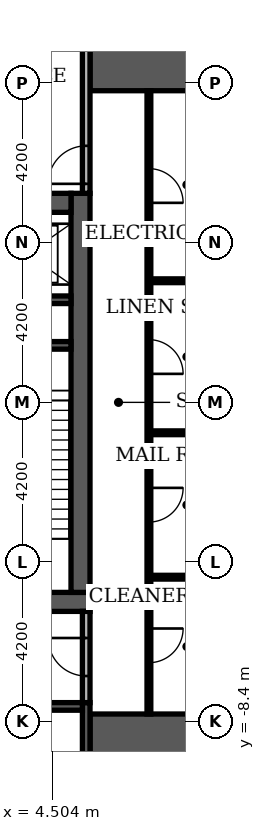
"""IFC4 building model, lengths in metres.
Left out: names, types, materials, properties, quantities, classifications, styles, units other than length and angle.
Written with IfcOpenShell. Run it as: python <this file> out.ifc"""

import sys

from ifc_helpers import new_model, si_unit, direction, frame, frame_2d, origin, place, context, subcontext, project, spatial, rectangle, extrude, element, fill, save


model = new_model("IFC4")
c1 = context("Model", 3, precision=1e-05, world=origin(), true_north=direction((0.0, 1.0)))
c2 = subcontext(c1, "Body", "Model", "MODEL_VIEW")
j1 = project(units=[si_unit("LENGTHUNIT", "METRE"), si_unit("PLANEANGLEUNIT", "RADIAN")], contexts=[c1])
p1 = place(None, origin())
s1 = spatial("IfcSite", under=j1, at=p1, CompositionType="ELEMENT")
p2 = place(p1, origin())
s2 = spatial("IfcBuilding", under=s1, at=p2, CompositionType="ELEMENT")
p3 = place(p2, frame((0.0, 0.0, 16.8)))
s3 = spatial("IfcBuildingStorey", under=s2, at=p3, CompositionType="ELEMENT", Elevation=16.8)
p4 = place(p3, frame((-5.5, -5.25, 0.0), z_axis=(0.0, 0.0, 1.0), x_axis=(1.0, 0.0, 0.0)))
e1 = element("IfcWall", 1, at=p4, inside=s3, PredefinedType="SHEAR", context=c2, shape_type="SweptSolid", body=[
    extrude(rectangle(XDim=11.0, YDim=0.5, at=frame_2d((5.5, 0.0))), origin(), (0.0, 0.0, 1.0), 4.98),
])
p5 = place(p4, frame((4.9, 0.0, 0.0)))
e2 = element("IfcOpeningElement", 2, at=p5, cuts=e1, PredefinedType="OPENING", context=c2, shape_type="SweptSolid", body=[
    extrude(rectangle(XDim=1.2, YDim=2.1, at=frame_2d((0.6, 1.05))), frame((0.0, 0.26, 0.0), z_axis=(0.0, -1.0, 0.0), x_axis=(1.0, 0.0, 0.0)), (0.0, 0.0, 1.0), 0.52),
])
p6 = place(p3, frame((5.25, -5.0, 0.0), z_axis=(0.0, 0.0, 1.0), x_axis=(0.0, 1.0, 0.0)))
e3 = element("IfcWall", 3, at=p6, inside=s3, PredefinedType="SHEAR", context=c2, shape_type="SweptSolid", body=[
    extrude(rectangle(XDim=10.5, YDim=0.5, at=frame_2d((5.25, 0.0))), origin(), (0.0, 0.0, 1.0), 4.98),
])
p7 = place(p3, frame((-5.0, 5.25, 0.0), z_axis=(0.0, 0.0, 1.0), x_axis=(1.0, 0.0, 0.0)))
e4 = element("IfcWall", 4, at=p7, inside=s3, PredefinedType="SHEAR", context=c2, shape_type="SweptSolid", body=[
    extrude(rectangle(XDim=10.0, YDim=0.5, at=frame_2d((5.0, 0.0))), origin(), (0.0, 0.0, 1.0), 4.98),
])
p8 = place(p7, frame((4.4, 0.0, 0.0)))
e5 = element("IfcOpeningElement", 5, at=p8, cuts=e4, PredefinedType="OPENING", context=c2, shape_type="SweptSolid", body=[
    extrude(rectangle(XDim=1.2, YDim=2.1, at=frame_2d((0.6, 1.05))), frame((0.0, 0.26, 0.0), z_axis=(0.0, -1.0, 0.0), x_axis=(1.0, 0.0, 0.0)), (0.0, 0.0, 1.0), 0.52),
])
for number, where, z_axis, x_axis in (
    (6, (5.5, -9.15, 0.0), (0.0, 0.0, 1.0), (1.0, 0.0, 0.0)),
    (7, (5.5, 9.15, 0.0), (0.0, 0.0, 1.0), (1.0, 0.0, 0.0)),
):
    element("IfcWall", number, at=place(p3, frame(where, z_axis=z_axis, x_axis=x_axis)), inside=s3, PredefinedType="SHEAR", context=c2, shape_type="SweptSolid", body=[
        extrude(rectangle(XDim=4.6, YDim=1.9, at=frame_2d((2.3, 0.0))), origin(), (0.0, 0.0, 1.0), 4.98),
    ])
p9 = place(p3, frame((2.15, 1.5, 0.0), z_axis=(0.0, 0.0, 1.0), x_axis=(1.0, 0.0, 0.0)))
e8 = element("IfcWall", 8, at=p9, inside=s3, PredefinedType="SHEAR", context=c2, shape_type="SweptSolid", body=[
    extrude(rectangle(XDim=2.85, YDim=0.2, at=frame_2d((1.425, 0.0))), origin(), (0.0, 0.0, 1.0), 4.98),
])
p10 = place(p3, frame((5.4, -10.1, 0.0), z_axis=(0.0, 0.0, 1.0), x_axis=(0.0, 1.0, 0.0)))
e9 = element("IfcWall", 9, at=p10, inside=s3, PredefinedType="SHEAR", context=c2, shape_type="SweptSolid", body=[
    extrude(rectangle(XDim=2.2, YDim=0.2, at=frame_2d((1.1, 0.0))), origin(), (0.0, 0.0, 1.0), 4.98),
])
p11 = place(p3, frame((2.8, -8.0, 0.0), z_axis=(0.0, 0.0, 1.0), x_axis=(1.0, 0.0, 0.0)))
e10 = element("IfcWall", 10, at=p11, inside=s3, PredefinedType="SHEAR", context=c2, shape_type="SweptSolid", body=[
    extrude(rectangle(XDim=2.5, YDim=0.2, at=frame_2d((1.25, 0.0))), origin(), (0.0, 0.0, 1.0), 4.98),
])
p12 = place(p3, frame((2.15, 2.7, 0.0), z_axis=(0.0, 0.0, 1.0), x_axis=(1.0, 0.0, 0.0)))
e11 = element("IfcWall", 11, at=p12, inside=s3, PredefinedType="SHEAR", context=c2, shape_type="SweptSolid", body=[
    extrude(rectangle(XDim=2.85, YDim=0.2, at=frame_2d((1.425, 0.0))), origin(), (0.0, 0.0, 1.0), 4.98),
])
p13 = place(p3, frame((7.05, -8.2, 0.0), z_axis=(0.0, 0.0, 1.0), x_axis=(0.0, 1.0, 0.0)))
e12 = element("IfcWall", 12, at=p13, inside=s3, PredefinedType="PARTITIONING", context=c2, shape_type="SweptSolid", body=[
    extrude(rectangle(XDim=16.4, YDim=0.1, at=frame_2d((8.2, 0.0))), origin(), (0.0, 0.0, 1.0), 4.98),
])
p14 = place(p13, frame((1.35, 0.0, 0.0)))
e13 = element("IfcOpeningElement", 13, at=p14, cuts=e12, PredefinedType="OPENING", context=c2, shape_type="SweptSolid", body=[
    extrude(rectangle(XDim=0.9, YDim=2.1, at=frame_2d((0.45, 1.05))), frame((0.0, 0.06, 0.0), z_axis=(0.0, -1.0, 0.0), x_axis=(1.0, 0.0, 0.0)), (0.0, 0.0, 1.0), 0.12),
])
p15 = place(p13, frame((5.05, 0.0, 0.0)))
e14 = element("IfcOpeningElement", 14, at=p15, cuts=e12, PredefinedType="OPENING", context=c2, shape_type="SweptSolid", body=[
    extrude(rectangle(XDim=0.9, YDim=2.1, at=frame_2d((0.45, 1.05))), frame((0.0, 0.06, 0.0), z_axis=(0.0, -1.0, 0.0), x_axis=(1.0, 0.0, 0.0)), (0.0, 0.0, 1.0), 0.12),
])
p16 = place(p13, frame((8.95, 0.0, 0.0)))
e15 = element("IfcOpeningElement", 15, at=p16, cuts=e12, PredefinedType="OPENING", context=c2, shape_type="SweptSolid", body=[
    extrude(rectangle(XDim=0.9, YDim=2.1, at=frame_2d((0.45, 1.05))), frame((0.0, 0.06, 0.0), z_axis=(0.0, -1.0, 0.0), x_axis=(1.0, 0.0, 0.0)), (0.0, 0.0, 1.0), 0.12),
])
p17 = place(p13, frame((13.45, 0.0, 0.0)))
e16 = element("IfcOpeningElement", 16, at=p17, cuts=e12, PredefinedType="OPENING", context=c2, shape_type="SweptSolid", body=[
    extrude(rectangle(XDim=0.9, YDim=2.1, at=frame_2d((0.45, 1.05))), frame((0.0, 0.06, 0.0), z_axis=(0.0, -1.0, 0.0), x_axis=(1.0, 0.0, 0.0)), (0.0, 0.0, 1.0), 0.12),
])
p18 = place(p3, frame((5.4, -7.9, 0.0), z_axis=(0.0, 0.0, 1.0), x_axis=(0.0, 1.0, 0.0)))
e17 = element("IfcWall", 17, at=p18, inside=s3, PredefinedType="PARTITIONING", context=c2, shape_type="SweptSolid", body=[
    extrude(rectangle(XDim=2.4, YDim=0.2, at=frame_2d((1.2, 0.0))), origin(), (0.0, 0.0, 1.0), 4.98),
])
p19 = place(p18, frame((0.7, 0.0, 0.0)))
e18 = element("IfcOpeningElement", 18, at=p19, cuts=e17, PredefinedType="OPENING", context=c2, shape_type="SweptSolid", body=[
    extrude(rectangle(XDim=1.0, YDim=2.1, at=frame_2d((0.5, 1.05))), frame((0.0, 0.11, 0.0), z_axis=(0.0, -1.0, 0.0), x_axis=(1.0, 0.0, 0.0)), (0.0, 0.0, 1.0), 0.22),
])
for number, where, z_axis, x_axis in (
    (19, (7.1, -4.6, 0.0), (0.0, 0.0, 1.0), (1.0, 0.0, 0.0)),
    (20, (7.1, -0.8, 0.0), (0.0, 0.0, 1.0), (1.0, 0.0, 0.0)),
    (21, (7.1, 3.2, 0.0), (0.0, 0.0, 1.0), (1.0, 0.0, 0.0)),
):
    element("IfcWall", number, at=place(p3, frame(where, z_axis=z_axis, x_axis=x_axis)), inside=s3, PredefinedType="PARTITIONING", context=c2, shape_type="SweptSolid", body=[
        extrude(rectangle(XDim=1.9, YDim=0.1, at=frame_2d((0.95, 0.0))), origin(), (0.0, 0.0, 1.0), 4.98),
    ])
p20 = place(p3, frame((5.4, 5.5, 0.0), z_axis=(0.0, 0.0, 1.0), x_axis=(0.0, 1.0, 0.0)))
e22 = element("IfcWall", 22, at=p20, inside=s3, PredefinedType="PARTITIONING", context=c2, shape_type="SweptSolid", body=[
    extrude(rectangle(XDim=4.6, YDim=0.2, at=frame_2d((2.3, 0.0))), origin(), (0.0, 0.0, 1.0), 4.98),
])
p21 = place(p20, frame((0.25, 0.0, 0.0)))
e23 = element("IfcOpeningElement", 23, at=p21, cuts=e22, PredefinedType="OPENING", context=c2, shape_type="SweptSolid", body=[
    extrude(rectangle(XDim=1.0, YDim=2.1, at=frame_2d((0.5, 1.05))), frame((0.0, 0.11, 0.0), z_axis=(0.0, -1.0, 0.0), x_axis=(1.0, 0.0, 0.0)), (0.0, 0.0, 1.0), 0.22),
])
p22 = place(p21, origin())
e24 = element("IfcDoor", 24, at=p22, inside=s3, OperationType="SINGLE_SWING_LEFT", PredefinedType="DOOR", context=c2, shape_type="SweptSolid", body=[
    extrude(rectangle(XDim=1.0, YDim=2.1, at=frame_2d((0.5, 1.05))), frame((0.0, 0.025, 0.0), z_axis=(0.0, -1.0, 0.0), x_axis=(1.0, 0.0, 0.0)), (0.0, 0.0, 1.0), 0.05),
])
fill(e23, e24)
p23 = place(p19, origin())
e25 = element("IfcDoor", 25, at=p23, inside=s3, OperationType="SINGLE_SWING_RIGHT", PredefinedType="DOOR", context=c2, shape_type="SweptSolid", body=[
    extrude(rectangle(XDim=1.0, YDim=2.1, at=frame_2d((0.5, 1.05))), frame((0.0, 0.025, 0.0), z_axis=(0.0, -1.0, 0.0), x_axis=(1.0, 0.0, 0.0)), (0.0, 0.0, 1.0), 0.05),
])
fill(e18, e25)
p24 = place(p14, frame((0.9, 0.0, 0.0), z_axis=(0.0, 0.0, 1.0), x_axis=(-1.0, 0.0, 0.0)))
e26 = element("IfcDoor", 26, at=p24, inside=s3, OperationType="SINGLE_SWING_RIGHT", PredefinedType="DOOR", context=c2, shape_type="SweptSolid", body=[
    extrude(rectangle(XDim=0.9, YDim=2.1, at=frame_2d((0.45, 1.05))), frame((0.0, 0.025, 0.0), z_axis=(0.0, -1.0, 0.0), x_axis=(1.0, 0.0, 0.0)), (0.0, 0.0, 1.0), 0.05),
])
fill(e13, e26)
p25 = place(p15, frame((0.9, 0.0, 0.0), z_axis=(0.0, 0.0, 1.0), x_axis=(-1.0, 0.0, 0.0)))
e27 = element("IfcDoor", 27, at=p25, inside=s3, OperationType="SINGLE_SWING_RIGHT", PredefinedType="DOOR", context=c2, shape_type="SweptSolid", body=[
    extrude(rectangle(XDim=0.9, YDim=2.1, at=frame_2d((0.45, 1.05))), frame((0.0, 0.025, 0.0), z_axis=(0.0, -1.0, 0.0), x_axis=(1.0, 0.0, 0.0)), (0.0, 0.0, 1.0), 0.05),
])
fill(e14, e27)
p26 = place(p16, frame((0.9, 0.0, 0.0), z_axis=(0.0, 0.0, 1.0), x_axis=(-1.0, 0.0, 0.0)))
e28 = element("IfcDoor", 28, at=p26, inside=s3, OperationType="SINGLE_SWING_LEFT", PredefinedType="DOOR", context=c2, shape_type="SweptSolid", body=[
    extrude(rectangle(XDim=0.9, YDim=2.1, at=frame_2d((0.45, 1.05))), frame((0.0, 0.025, 0.0), z_axis=(0.0, -1.0, 0.0), x_axis=(1.0, 0.0, 0.0)), (0.0, 0.0, 1.0), 0.05),
])
fill(e15, e28)
p27 = place(p17, frame((0.9, 0.0, 0.0), z_axis=(0.0, 0.0, 1.0), x_axis=(-1.0, 0.0, 0.0)))
e29 = element("IfcDoor", 29, at=p27, inside=s3, OperationType="SINGLE_SWING_LEFT", PredefinedType="DOOR", context=c2, shape_type="SweptSolid", body=[
    extrude(rectangle(XDim=0.9, YDim=2.1, at=frame_2d((0.45, 1.05))), frame((0.0, 0.025, 0.0), z_axis=(0.0, -1.0, 0.0), x_axis=(1.0, 0.0, 0.0)), (0.0, 0.0, 1.0), 0.05),
])
fill(e16, e29)
save(model, sys.argv[1])
